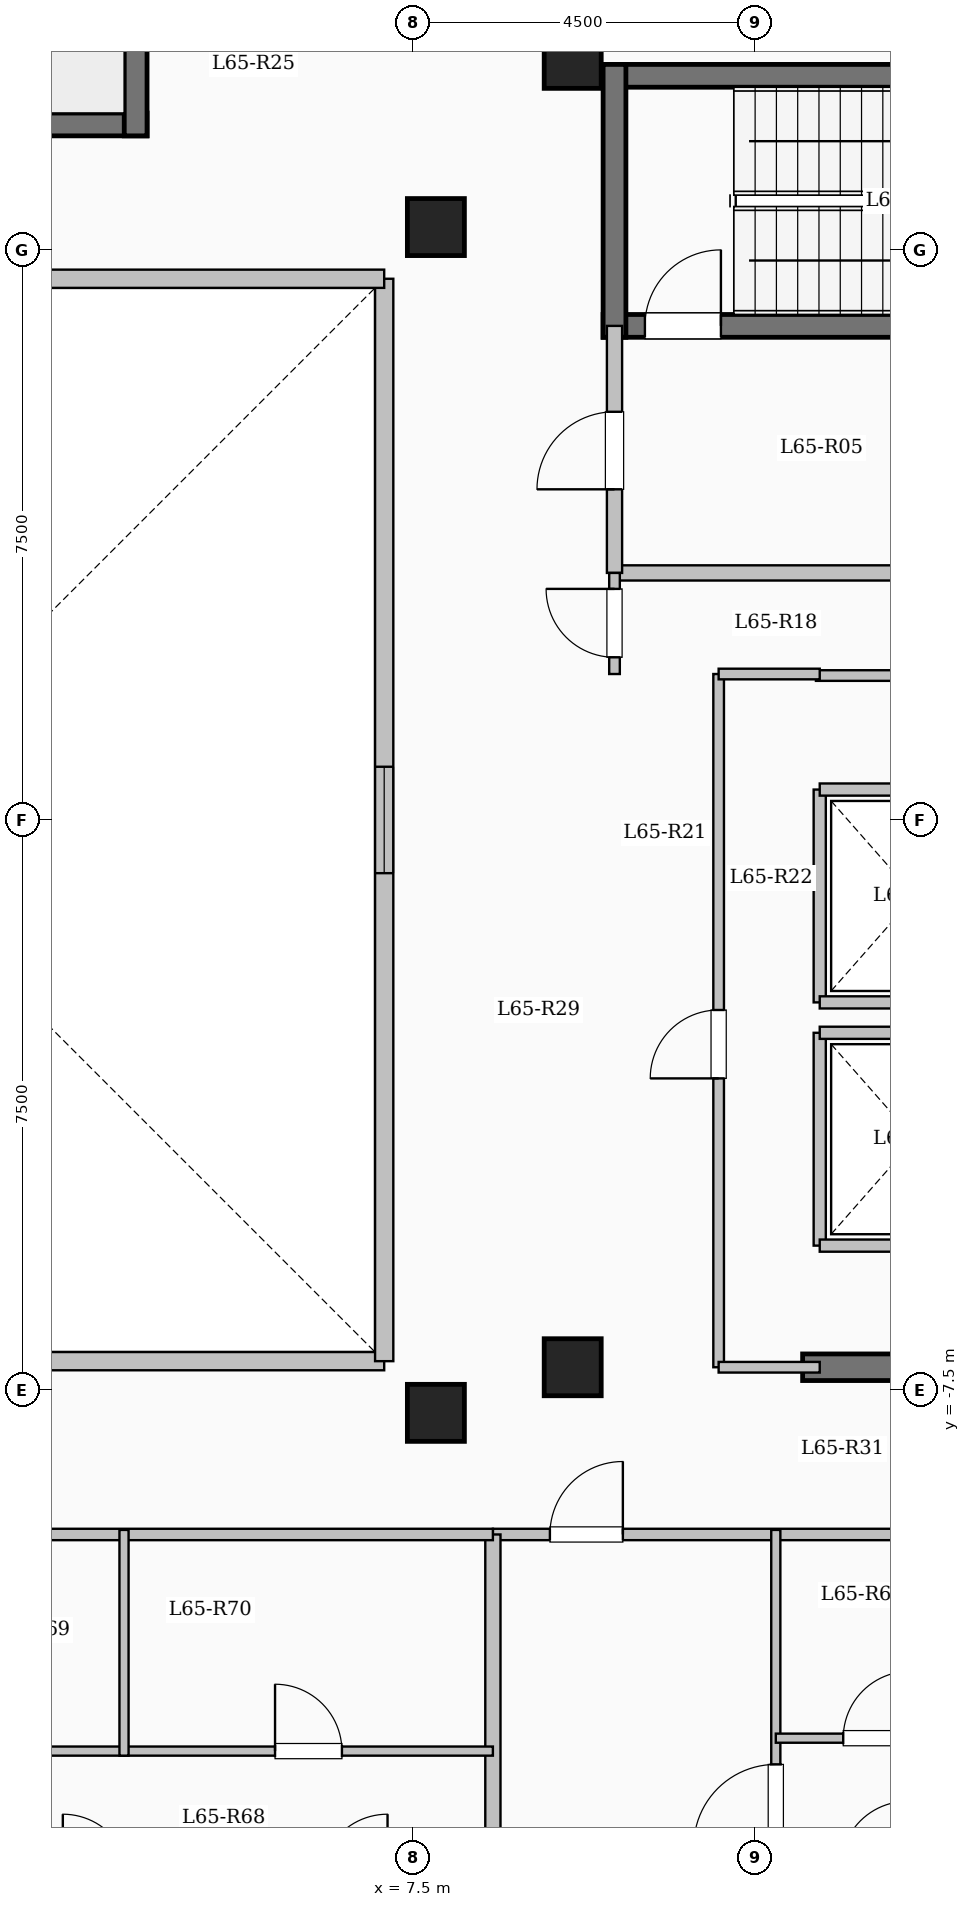
"""IFC4 building model, lengths in metres.
Left out: names, types, materials, properties, quantities, classifications, styles, units other than length and angle.
Written with IfcOpenShell. Run it as: python <this file> out.ifc"""

import sys

from ifc_helpers import new_model, si_unit, direction, frame, frame_2d, origin, origin_2d, place, context, subcontext, project, spatial, rectangle, extrude, element, fill, save


model = new_model("IFC4")
c1 = context("Model", 3, precision=1e-05, world=origin(), true_north=direction((0.0, 1.0)))
c2 = subcontext(c1, "Body", "Model", "MODEL_VIEW")
j1 = project(units=[si_unit("LENGTHUNIT", "METRE"), si_unit("PLANEANGLEUNIT", "RADIAN")], contexts=[c1])
p1 = place(None, origin())
s1 = spatial("IfcSite", under=j1, at=p1, CompositionType="ELEMENT")
p2 = place(p1, origin())
s2 = spatial("IfcBuilding", under=s1, at=p2, CompositionType="ELEMENT")
p3 = place(p2, frame((0.0, 0.0, 241.5)))
s3 = spatial("IfcBuildingStorey", under=s2, at=p3, CompositionType="ELEMENT", Elevation=241.5)
for number, where, z_axis, x_axis in (
    (1, (7.8, -7.8, 0.0), (0.0, 0.0, 1.0), (1.0, 0.0, 0.0)),
    (2, (7.8, 7.8, 0.0), (0.0, 0.0, 1.0), (1.0, 0.0, 0.0)),
    (3, (9.6, -7.2, 0.0), (0.0, 0.0, 1.0), (1.0, 0.0, 0.0)),
    (4, (9.6, 10.0, 0.0), (0.0, 0.0, 1.0), (1.0, 0.0, 0.0)),
):
    element("IfcColumn", number, at=place(p3, frame(where, z_axis=z_axis, x_axis=x_axis)), inside=s3, PredefinedType="COLUMN", context=c2, shape_type="SweptSolid", body=[
        extrude(rectangle(XDim=0.75, YDim=0.75, at=origin_2d()), origin(), (0.0, 0.0, 1.0), 3.35),
    ])
p4 = place(p3, frame((-7.12, -7.12, 0.0), z_axis=(0.0, 0.0, 1.0), x_axis=(1.0, 0.0, 0.0)))
e5 = element("IfcWall", 5, at=p4, inside=s3, PredefinedType="SOLIDWALL", context=c2, shape_type="SweptSolid", body=[
    extrude(rectangle(XDim=14.24, YDim=0.24, at=frame_2d((7.12, 0.0))), origin(), (0.0, 0.0, 1.0), 3.1),
])
p5 = place(p4, frame((6.42, 0.0, 0.95)))
e6 = element("IfcOpeningElement", 6, at=p5, cuts=e5, PredefinedType="OPENING", context=c2, shape_type="SweptSolid", body=[
    extrude(rectangle(XDim=1.4, YDim=1.5, at=frame_2d((0.7, 0.75))), frame((0.0, 0.13, 0.0), z_axis=(0.0, -1.0, 0.0), x_axis=(1.0, 0.0, 0.0)), (0.0, 0.0, 1.0), 0.26),
])
p6 = place(p3, frame((7.12, -7.12, 0.0), z_axis=(0.0, 0.0, 1.0), x_axis=(0.0, 1.0, 0.0)))
e7 = element("IfcWall", 7, at=p6, inside=s3, PredefinedType="SOLIDWALL", context=c2, shape_type="SweptSolid", body=[
    extrude(rectangle(XDim=14.24, YDim=0.24, at=frame_2d((7.12, 0.0))), origin(), (0.0, 0.0, 1.0), 3.1),
])
p7 = place(p6, frame((6.42, 0.0, 0.95)))
e8 = element("IfcOpeningElement", 8, at=p7, cuts=e7, PredefinedType="OPENING", context=c2, shape_type="SweptSolid", body=[
    extrude(rectangle(XDim=1.4, YDim=1.5, at=frame_2d((0.7, 0.75))), frame((0.0, 0.13, 0.0), z_axis=(0.0, -1.0, 0.0), x_axis=(1.0, 0.0, 0.0)), (0.0, 0.0, 1.0), 0.26),
])
p8 = place(p3, frame((7.12, 7.12, 0.0), z_axis=(0.0, 0.0, 1.0), x_axis=(-1.0, 0.0, 0.0)))
e9 = element("IfcWall", 9, at=p8, inside=s3, PredefinedType="SOLIDWALL", context=c2, shape_type="SweptSolid", body=[
    extrude(rectangle(XDim=14.24, YDim=0.24, at=frame_2d((7.12, 0.0))), origin(), (0.0, 0.0, 1.0), 3.1),
])
p9 = place(p8, frame((6.42, 0.0, 0.95)))
e10 = element("IfcOpeningElement", 10, at=p9, cuts=e9, PredefinedType="OPENING", context=c2, shape_type="SweptSolid", body=[
    extrude(rectangle(XDim=1.4, YDim=1.5, at=frame_2d((0.7, 0.75))), frame((0.0, 0.13, 0.0), z_axis=(0.0, -1.0, 0.0), x_axis=(1.0, 0.0, 0.0)), (0.0, 0.0, 1.0), 0.26),
])
p10 = place(p3, frame((10.0, 9.79, 0.0), z_axis=(0.0, 0.0, 1.0), x_axis=(1.0, 0.0, 0.0)))
e11 = element("IfcWall", 11, at=p10, inside=s3, PredefinedType="SHEAR", context=c2, shape_type="SweptSolid", body=[
    extrude(rectangle(XDim=8.0, YDim=0.3, at=frame_2d((4.0, 0.0))), origin(), (0.0, 0.0, 1.0), 3.35),
])
p11 = place(p3, frame((10.0, 6.5, 0.0), z_axis=(0.0, 0.0, 1.0), x_axis=(1.0, 0.0, 0.0)))
e12 = element("IfcWall", 12, at=p11, inside=s3, PredefinedType="SHEAR", context=c2, shape_type="SweptSolid", body=[
    extrude(rectangle(XDim=8.0, YDim=0.3, at=frame_2d((4.0, 0.0))), origin(), (0.0, 0.0, 1.0), 3.35),
])
p12 = place(p11, frame((0.55, 0.0, 0.0)))
e13 = element("IfcOpeningElement", 13, at=p12, cuts=e12, PredefinedType="OPENING", context=c2, shape_type="SweptSolid", body=[
    extrude(rectangle(XDim=1.0, YDim=2.15, at=frame_2d((0.5, 1.075))), frame((0.0, 0.16, 0.0), z_axis=(0.0, -1.0, 0.0), x_axis=(1.0, 0.0, 0.0)), (0.0, 0.0, 1.0), 0.32),
])
p13 = place(p3, frame((10.15, 6.35, 0.0), z_axis=(0.0, 0.0, 1.0), x_axis=(0.0, 1.0, 0.0)))
e14 = element("IfcWall", 14, at=p13, inside=s3, PredefinedType="SHEAR", context=c2, shape_type="SweptSolid", body=[
    extrude(rectangle(XDim=3.59, YDim=0.3, at=frame_2d((1.795, 0.0))), origin(), (0.0, 0.0, 1.0), 3.35),
])
p14 = place(p3, frame((-4.0, 9.15, 0.0), z_axis=(0.0, 0.0, 1.0), x_axis=(1.0, 0.0, 0.0)))
e15 = element("IfcWall", 15, at=p14, inside=s3, PredefinedType="SHEAR", context=c2, shape_type="SweptSolid", body=[
    extrude(rectangle(XDim=8.0, YDim=0.3, at=frame_2d((4.0, 0.0))), origin(), (0.0, 0.0, 1.0), 3.35),
])
p15 = place(p14, frame((0.55, 0.0, 0.0)))
e16 = element("IfcOpeningElement", 16, at=p15, cuts=e15, PredefinedType="OPENING", context=c2, shape_type="SweptSolid", body=[
    extrude(rectangle(XDim=1.0, YDim=2.15, at=frame_2d((0.5, 1.075))), frame((0.0, 0.16, 0.0), z_axis=(0.0, -1.0, 0.0), x_axis=(1.0, 0.0, 0.0)), (0.0, 0.0, 1.0), 0.32),
])
p16 = place(p3, frame((3.85, 9.0, 0.0), z_axis=(0.0, 0.0, 1.0), x_axis=(0.0, 1.0, 0.0)))
e17 = element("IfcWall", 17, at=p16, inside=s3, PredefinedType="SHEAR", context=c2, shape_type="SweptSolid", body=[
    extrude(rectangle(XDim=3.59, YDim=0.3, at=frame_2d((1.795, 0.0))), origin(), (0.0, 0.0, 1.0), 3.35),
])
p17 = place(p3, frame((10.15, 3.25, 0.0), z_axis=(0.0, 0.0, 1.0), x_axis=(1.0, 0.0, 0.0)))
e18 = element("IfcWall", 18, at=p17, inside=s3, PredefinedType="SOLIDWALL", context=c2, shape_type="SweptSolid", body=[
    extrude(rectangle(XDim=5.4, YDim=0.2, at=frame_2d((2.7, 0.0))), origin(), (0.0, 0.0, 1.0), 3.1),
])
p18 = place(p3, frame((10.15, 3.25, 0.0), z_axis=(0.0, 0.0, 1.0), x_axis=(0.0, 1.0, 0.0)))
e19 = element("IfcWall", 19, at=p18, inside=s3, PredefinedType="SOLIDWALL", context=c2, shape_type="SweptSolid", body=[
    extrude(rectangle(XDim=3.25, YDim=0.2, at=frame_2d((1.625, 0.0))), origin(), (0.0, 0.0, 1.0), 3.1),
])
p19 = place(p18, frame((1.1, 0.0, 0.0)))
e20 = element("IfcOpeningElement", 20, at=p19, cuts=e19, PredefinedType="OPENING", context=c2, shape_type="SweptSolid", body=[
    extrude(rectangle(XDim=1.02, YDim=2.15, at=frame_2d((0.51, 1.075))), frame((0.0, 0.11, 0.0), z_axis=(0.0, -1.0, 0.0), x_axis=(1.0, 0.0, 0.0)), (0.0, 0.0, 1.0), 0.22),
])
p20 = place(p3, frame((12.85, -5.6, 0.0), z_axis=(0.0, 0.0, 1.0), x_axis=(0.0, 1.0, 0.0)))
e21 = element("IfcWall", 21, at=p20, inside=s3, PredefinedType="SOLIDWALL", context=c2, shape_type="SweptSolid", body=[
    extrude(rectangle(XDim=2.8, YDim=0.16, at=frame_2d((1.4, 0.0))), origin(), (0.0, 0.0, 1.0), 3.1),
])
for number, where, z_axis, x_axis in (
    (22, (12.85, -5.6, 0.0), (0.0, 0.0, 1.0), (1.0, 0.0, 0.0)),
    (23, (12.85, -2.8, 0.0), (0.0, 0.0, 1.0), (1.0, 0.0, 0.0)),
):
    element("IfcWall", number, at=place(p3, frame(where, z_axis=z_axis, x_axis=x_axis)), inside=s3, PredefinedType="SOLIDWALL", context=c2, shape_type="SweptSolid", body=[
        extrude(rectangle(XDim=2.5, YDim=0.16, at=frame_2d((1.25, 0.0))), origin(), (0.0, 0.0, 1.0), 3.1),
    ])
p21 = place(p3, frame((12.85, -2.4, 0.0), z_axis=(0.0, 0.0, 1.0), x_axis=(0.0, 1.0, 0.0)))
e24 = element("IfcWall", 24, at=p21, inside=s3, PredefinedType="SOLIDWALL", context=c2, shape_type="SweptSolid", body=[
    extrude(rectangle(XDim=2.8, YDim=0.16, at=frame_2d((1.4, 0.0))), origin(), (0.0, 0.0, 1.0), 3.1),
])
for number, where, z_axis, x_axis in (
    (25, (12.85, -2.4, 0.0), (0.0, 0.0, 1.0), (1.0, 0.0, 0.0)),
    (26, (12.85, 0.4, 0.0), (0.0, 0.0, 1.0), (1.0, 0.0, 0.0)),
):
    element("IfcWall", number, at=place(p3, frame(where, z_axis=z_axis, x_axis=x_axis)), inside=s3, PredefinedType="SOLIDWALL", context=c2, shape_type="SweptSolid", body=[
        extrude(rectangle(XDim=2.5, YDim=0.16, at=frame_2d((1.25, 0.0))), origin(), (0.0, 0.0, 1.0), 3.1),
    ])
p22 = place(p3, frame((12.625, -7.2, 0.0), z_axis=(0.0, 0.0, 1.0), x_axis=(1.0, 0.0, 0.0)))
e27 = element("IfcWall", 27, at=p22, inside=s3, PredefinedType="SHEAR", context=c2, shape_type="SweptSolid", body=[
    extrude(rectangle(XDim=6.0, YDim=0.35, at=frame_2d((3.0, 0.0))), origin(), (0.0, 0.0, 1.0), 3.35),
])
p23 = place(p3, frame((12.8, 1.9, 0.0), z_axis=(0.0, 0.0, 1.0), x_axis=(1.0, 0.0, 0.0)))
e28 = element("IfcWall", 28, at=p23, inside=s3, PredefinedType="PARTITIONING", context=c2, shape_type="SweptSolid", body=[
    extrude(rectangle(XDim=2.6, YDim=0.14, at=frame_2d((1.3, 0.0))), origin(), (0.0, 0.0, 1.0), 3.1),
])
p24 = place(p3, frame((10.15, 1.92, 0.0), z_axis=(0.0, 0.0, 1.0), x_axis=(0.0, 1.0, 0.0)))
e29 = element("IfcWall", 29, at=p24, inside=s3, PredefinedType="PARTITIONING", context=c2, shape_type="SweptSolid", body=[
    extrude(rectangle(XDim=1.33, YDim=0.14, at=frame_2d((0.665, 0.0))), origin(), (0.0, 0.0, 1.0), 3.1),
])
p25 = place(p24, frame((0.22, 0.0, 0.0)))
e30 = element("IfcOpeningElement", 30, at=p25, cuts=e29, PredefinedType="OPENING", context=c2, shape_type="SweptSolid", body=[
    extrude(rectangle(XDim=0.9, YDim=2.08, at=frame_2d((0.45, 1.04))), frame((0.0, 0.08, 0.0), z_axis=(0.0, -1.0, 0.0), x_axis=(1.0, 0.0, 0.0)), (0.0, 0.0, 1.0), 0.16),
])
p26 = place(p3, frame((11.52, -7.2, 0.0), z_axis=(0.0, 0.0, 1.0), x_axis=(0.0, 1.0, 0.0)))
e31 = element("IfcWall", 31, at=p26, inside=s3, PredefinedType="PARTITIONING", context=c2, shape_type="SweptSolid", body=[
    extrude(rectangle(XDim=9.12, YDim=0.14, at=frame_2d((4.56, 0.0))), origin(), (0.0, 0.0, 1.0), 3.1),
])
p27 = place(p26, frame((3.8, 0.0, 0.0)))
e32 = element("IfcOpeningElement", 32, at=p27, cuts=e31, PredefinedType="OPENING", context=c2, shape_type="SweptSolid", body=[
    extrude(rectangle(XDim=0.9, YDim=2.08, at=frame_2d((0.45, 1.04))), frame((0.0, 0.08, 0.0), z_axis=(0.0, -1.0, 0.0), x_axis=(1.0, 0.0, 0.0)), (0.0, 0.0, 1.0), 0.16),
])
p28 = place(p3, frame((11.52, 1.92, 0.0), z_axis=(0.0, 0.0, 1.0), x_axis=(1.0, 0.0, 0.0)))
e33 = element("IfcWall", 33, at=p28, inside=s3, PredefinedType="PARTITIONING", context=c2, shape_type="SweptSolid", body=[
    extrude(rectangle(XDim=1.33, YDim=0.14, at=frame_2d((0.665, 0.0))), origin(), (0.0, 0.0, 1.0), 3.1),
])
p29 = place(p3, frame((11.52, -7.2, 0.0), z_axis=(0.0, 0.0, 1.0), x_axis=(1.0, 0.0, 0.0)))
e34 = element("IfcWall", 34, at=p29, inside=s3, PredefinedType="PARTITIONING", context=c2, shape_type="SweptSolid", body=[
    extrude(rectangle(XDim=1.33, YDim=0.14, at=frame_2d((0.665, 0.0))), origin(), (0.0, 0.0, 1.0), 2.235),
])
p30 = place(p3, frame((8.55, -9.4, 0.0), z_axis=(0.0, 0.0, 1.0), x_axis=(1.0, 0.0, 0.0)))
e35 = element("IfcWall", 35, at=p30, inside=s3, PredefinedType="PARTITIONING", context=c2, shape_type="SweptSolid", body=[
    extrude(rectangle(XDim=9.2, YDim=0.15, at=frame_2d((4.6, 0.0))), origin(), (0.0, 0.0, 1.0), 3.1),
])
p31 = place(p30, frame((0.75, 0.0, 0.0)))
e36 = element("IfcOpeningElement", 36, at=p31, cuts=e35, PredefinedType="OPENING", context=c2, shape_type="SweptSolid", body=[
    extrude(rectangle(XDim=0.96, YDim=2.15, at=frame_2d((0.48, 1.075))), frame((0.0, 0.085, 0.0), z_axis=(0.0, -1.0, 0.0), x_axis=(1.0, 0.0, 0.0)), (0.0, 0.0, 1.0), 0.17),
])
p32 = place(p3, frame((12.272, -20.9, 0.0), z_axis=(0.0, 0.0, 1.0), x_axis=(0.0, 1.0, 0.0)))
e37 = element("IfcWall", 37, at=p32, inside=s3, PredefinedType="PARTITIONING", context=c2, shape_type="SweptSolid", body=[
    extrude(rectangle(XDim=11.56, YDim=0.12, at=frame_2d((5.78, 0.0))), origin(), (0.0, 0.0, 1.0), 3.1),
])
p33 = place(p32, frame((7.395, 0.0, 0.0)))
e38 = element("IfcOpeningElement", 38, at=p33, cuts=e37, PredefinedType="OPENING", context=c2, shape_type="SweptSolid", body=[
    extrude(rectangle(XDim=1.08, YDim=2.15, at=frame_2d((0.54, 1.075))), frame((0.0, 0.07, 0.0), z_axis=(0.0, -1.0, 0.0), x_axis=(1.0, 0.0, 0.0)), (0.0, 0.0, 1.0), 0.14),
])
p34 = place(p3, frame((12.272, -12.08, 0.0), z_axis=(0.0, 0.0, 1.0), x_axis=(1.0, 0.0, 0.0)))
e39 = element("IfcWall", 39, at=p34, inside=s3, PredefinedType="PARTITIONING", context=c2, shape_type="SweptSolid", body=[
    extrude(rectangle(XDim=2.655, YDim=0.12, at=frame_2d((1.328, 0.0))), origin(), (0.0, 0.0, 1.0), 2.785),
])
p35 = place(p34, frame((0.887, 0.0, 0.0)))
e40 = element("IfcOpeningElement", 40, at=p35, cuts=e39, PredefinedType="OPENING", context=c2, shape_type="SweptSolid", body=[
    extrude(rectangle(XDim=0.88, YDim=2.1, at=frame_2d((0.44, 1.05))), frame((0.0, 0.07, 0.0), z_axis=(0.0, -1.0, 0.0), x_axis=(1.0, 0.0, 0.0)), (0.0, 0.0, 1.0), 0.14),
])
p36 = place(p3, frame((8.55, -21.504, 0.0), z_axis=(0.0, 0.0, 1.0), x_axis=(0.0, 1.0, 0.0)))
e41 = element("IfcWall", 41, at=p36, inside=s3, PredefinedType="SOLIDWALL", context=c2, shape_type="SweptSolid", body=[
    extrude(rectangle(XDim=12.104, YDim=0.2, at=frame_2d((6.052, 0.0))), origin(), (0.0, 0.0, 1.0), 3.1),
])
p37 = place(p3, frame((-8.55, -9.4, 0.0), z_axis=(0.0, 0.0, 1.0), x_axis=(1.0, 0.0, 0.0)))
e42 = element("IfcWall", 42, at=p37, inside=s3, PredefinedType="PARTITIONING", context=c2, shape_type="SweptSolid", body=[
    extrude(rectangle(XDim=17.1, YDim=0.15, at=frame_2d((8.55, 0.0))), origin(), (0.0, 0.0, 1.0), 3.1),
])
p38 = place(p37, frame((1.75, 0.0, 0.0)))
e43 = element("IfcOpeningElement", 43, at=p38, cuts=e42, PredefinedType="OPENING", context=c2, shape_type="SweptSolid", body=[
    extrude(rectangle(XDim=0.96, YDim=2.15, at=frame_2d((0.48, 1.075))), frame((0.0, 0.085, 0.0), z_axis=(0.0, -1.0, 0.0), x_axis=(1.0, 0.0, 0.0)), (0.0, 0.0, 1.0), 0.17),
])
p39 = place(p3, frame((-1.696, -12.25, 0.0), z_axis=(0.0, 0.0, 1.0), x_axis=(1.0, 0.0, 0.0)))
e44 = element("IfcWall", 44, at=p39, inside=s3, PredefinedType="PARTITIONING", context=c2, shape_type="SweptSolid", body=[
    extrude(rectangle(XDim=5.393, YDim=0.12, at=frame_2d((2.697, 0.0))), origin(), (0.0, 0.0, 1.0), 2.785),
])
p40 = place(p39, frame((2.256, 0.0, 0.0)))
e45 = element("IfcOpeningElement", 45, at=p40, cuts=e44, PredefinedType="OPENING", context=c2, shape_type="SweptSolid", body=[
    extrude(rectangle(XDim=0.88, YDim=2.1, at=frame_2d((0.44, 1.05))), frame((0.0, 0.07, 0.0), z_axis=(0.0, -1.0, 0.0), x_axis=(1.0, 0.0, 0.0)), (0.0, 0.0, 1.0), 0.14),
])
p41 = place(p3, frame((3.697, -12.25, 0.0), z_axis=(0.0, 0.0, 1.0), x_axis=(1.0, 0.0, 0.0)))
e46 = element("IfcWall", 46, at=p41, inside=s3, PredefinedType="PARTITIONING", context=c2, shape_type="SweptSolid", body=[
    extrude(rectangle(XDim=4.853, YDim=0.12, at=frame_2d((2.427, 0.0))), origin(), (0.0, 0.0, 1.0), 2.785),
])
p42 = place(p41, frame((1.987, 0.0, 0.0)))
e47 = element("IfcOpeningElement", 47, at=p42, cuts=e46, PredefinedType="OPENING", context=c2, shape_type="SweptSolid", body=[
    extrude(rectangle(XDim=0.88, YDim=2.1, at=frame_2d((0.44, 1.05))), frame((0.0, 0.07, 0.0), z_axis=(0.0, -1.0, 0.0), x_axis=(1.0, 0.0, 0.0)), (0.0, 0.0, 1.0), 0.14),
])
p43 = place(p3, frame((3.697, -12.31, 0.0), z_axis=(0.0, 0.0, 1.0), x_axis=(0.0, 1.0, 0.0)))
e48 = element("IfcWall", 48, at=p43, inside=s3, PredefinedType="PARTITIONING", context=c2, shape_type="SweptSolid", body=[
    extrude(rectangle(XDim=2.97, YDim=0.12, at=frame_2d((1.485, 0.0))), origin(), (0.0, 0.0, 1.0), 3.1),
])
p44 = place(p7, origin())
e49 = element("IfcWindow", 49, at=p44, inside=s3, PartitioningType="SINGLE_PANEL", PredefinedType="WINDOW", context=c2, shape_type="SweptSolid", body=[
    extrude(rectangle(XDim=1.4, YDim=1.5, at=frame_2d((0.7, 0.75))), frame((0.0, 0.03, 0.0), z_axis=(0.0, -1.0, 0.0), x_axis=(1.0, 0.0, 0.0)), (0.0, 0.0, 1.0), 0.06),
])
fill(e8, e49)
p45 = place(p12, origin())
e50 = element("IfcDoor", 50, at=p45, inside=s3, OperationType="SINGLE_SWING_RIGHT", PredefinedType="DOOR", context=c2, shape_type="SweptSolid", body=[
    extrude(rectangle(XDim=1.0, YDim=2.15, at=frame_2d((0.5, 1.075))), frame((0.0, 0.025, 0.0), z_axis=(0.0, -1.0, 0.0), x_axis=(1.0, 0.0, 0.0)), (0.0, 0.0, 1.0), 0.05),
])
fill(e13, e50)
p46 = place(p19, origin())
e51 = element("IfcDoor", 51, at=p46, inside=s3, OperationType="SINGLE_SWING_LEFT", PredefinedType="DOOR", context=c2, shape_type="SweptSolid", body=[
    extrude(rectangle(XDim=1.02, YDim=2.15, at=frame_2d((0.51, 1.075))), frame((0.0, 0.025, 0.0), z_axis=(0.0, -1.0, 0.0), x_axis=(1.0, 0.0, 0.0)), (0.0, 0.0, 1.0), 0.05),
])
fill(e20, e51)
p47 = place(p25, origin())
e52 = element("IfcDoor", 52, at=p47, inside=s3, OperationType="SINGLE_SWING_RIGHT", PredefinedType="DOOR", context=c2, shape_type="SweptSolid", body=[
    extrude(rectangle(XDim=0.9, YDim=2.08, at=frame_2d((0.45, 1.04))), frame((0.0, 0.025, 0.0), z_axis=(0.0, -1.0, 0.0), x_axis=(1.0, 0.0, 0.0)), (0.0, 0.0, 1.0), 0.05),
])
fill(e30, e52)
p48 = place(p27, origin())
e53 = element("IfcDoor", 53, at=p48, inside=s3, OperationType="SINGLE_SWING_LEFT", PredefinedType="DOOR", context=c2, shape_type="SweptSolid", body=[
    extrude(rectangle(XDim=0.9, YDim=2.08, at=frame_2d((0.45, 1.04))), frame((0.0, 0.025, 0.0), z_axis=(0.0, -1.0, 0.0), x_axis=(1.0, 0.0, 0.0)), (0.0, 0.0, 1.0), 0.05),
])
fill(e32, e53)
p49 = place(p31, origin())
e54 = element("IfcDoor", 54, at=p49, inside=s3, OperationType="SINGLE_SWING_RIGHT", PredefinedType="DOOR", context=c2, shape_type="SweptSolid", body=[
    extrude(rectangle(XDim=0.96, YDim=2.15, at=frame_2d((0.48, 1.075))), frame((0.0, 0.025, 0.0), z_axis=(0.0, -1.0, 0.0), x_axis=(1.0, 0.0, 0.0)), (0.0, 0.0, 1.0), 0.05),
])
fill(e36, e54)
p50 = place(p33, origin())
e55 = element("IfcDoor", 55, at=p50, inside=s3, OperationType="SINGLE_SWING_LEFT", PredefinedType="DOOR", context=c2, shape_type="SweptSolid", body=[
    extrude(rectangle(XDim=1.08, YDim=2.15, at=frame_2d((0.54, 1.075))), frame((0.0, 0.025, 0.0), z_axis=(0.0, -1.0, 0.0), x_axis=(1.0, 0.0, 0.0)), (0.0, 0.0, 1.0), 0.05),
])
fill(e38, e55)
p51 = place(p35, origin())
e56 = element("IfcDoor", 56, at=p51, inside=s3, OperationType="SINGLE_SWING_RIGHT", PredefinedType="DOOR", context=c2, shape_type="SweptSolid", body=[
    extrude(rectangle(XDim=0.88, YDim=2.1, at=frame_2d((0.44, 1.05))), frame((0.0, 0.025, 0.0), z_axis=(0.0, -1.0, 0.0), x_axis=(1.0, 0.0, 0.0)), (0.0, 0.0, 1.0), 0.05),
])
fill(e40, e56)
p52 = place(p42, origin())
e57 = element("IfcDoor", 57, at=p52, inside=s3, OperationType="SINGLE_SWING_LEFT", PredefinedType="DOOR", context=c2, shape_type="SweptSolid", body=[
    extrude(rectangle(XDim=0.88, YDim=2.1, at=frame_2d((0.44, 1.05))), frame((0.0, 0.025, 0.0), z_axis=(0.0, -1.0, 0.0), x_axis=(1.0, 0.0, 0.0)), (0.0, 0.0, 1.0), 0.05),
])
fill(e47, e57)
save(model, sys.argv[1])
